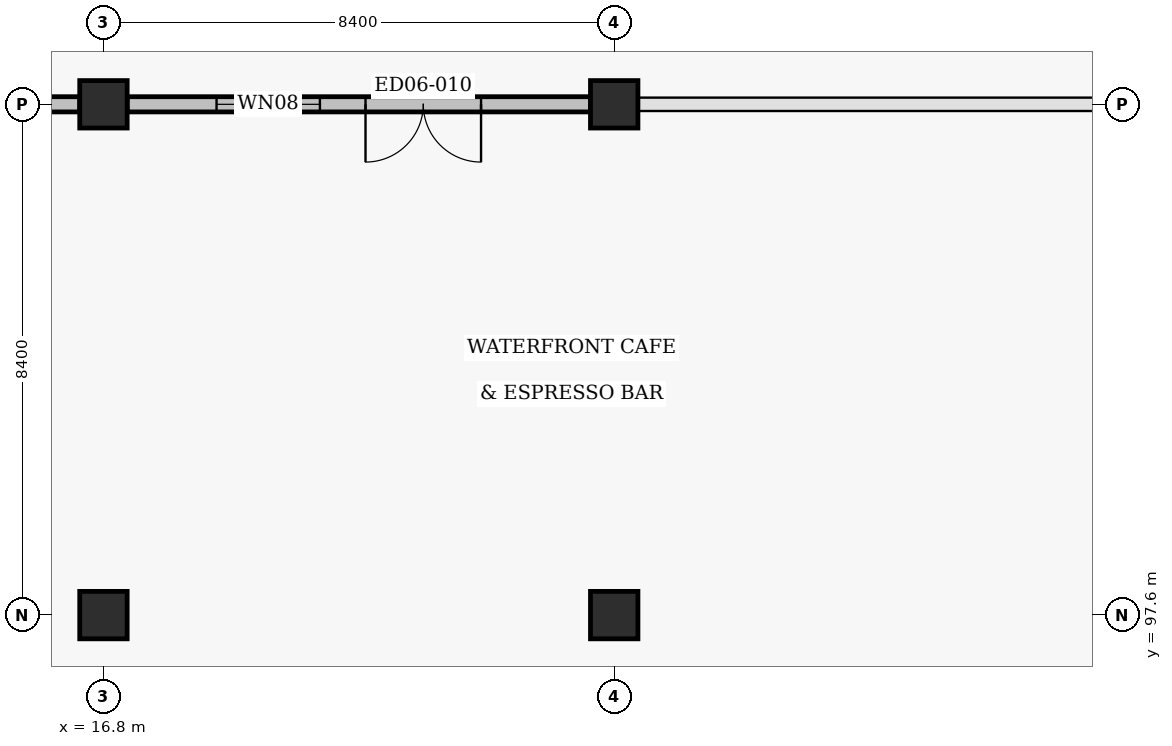
"""IFC4 building model, lengths in metres.
Left out: names, types, materials, properties, quantities, classifications, styles, units other than length and angle.
Written with IfcOpenShell. Run it as: python <this file> out.ifc"""

import sys

from ifc_helpers import new_model, si_unit, direction, frame, frame_2d, origin, origin_2d, place, context, subcontext, project, spatial, rectangle, circle, extrude, element, fill, save


model = new_model("IFC4")
c1 = context("Model", 3, precision=1e-05, world=origin(), true_north=direction((0.0, 1.0)))
c2 = subcontext(c1, "Body", "Model", "MODEL_VIEW")
j1 = project(units=[si_unit("LENGTHUNIT", "METRE"), si_unit("PLANEANGLEUNIT", "RADIAN")], contexts=[c1])
p1 = place(None, origin())
s1 = spatial("IfcSite", under=j1, at=p1, CompositionType="ELEMENT")
p2 = place(p1, origin())
s2 = spatial("IfcBuilding", under=s1, at=p2, CompositionType="ELEMENT")
p3 = place(p2, frame((0.0, 0.0, 9.6)))
s3 = spatial("IfcBuildingStorey", under=s2, at=p3, CompositionType="ELEMENT", Elevation=9.6)
p4 = place(p3, frame((16.8, 97.6, 0.0), z_axis=(0.0, 0.0, 1.0), x_axis=(1.0, 0.0, 0.0)))
e1 = element("IfcColumn", 1, at=p4, inside=s3, PredefinedType="COLUMN", context=c2, shape_type="SweptSolid", body=[
    extrude(circle(Radius=0.39, at=origin_2d()), origin(), (0.0, 0.0, 1.0), 10.186),
])
p5 = place(p3, frame((16.8, 106.0, 0.0), z_axis=(0.0, 0.0, 1.0), x_axis=(1.0, 0.0, 0.0)))
e2 = element("IfcColumn", 2, at=p5, inside=s3, PredefinedType="COLUMN", context=c2, shape_type="SweptSolid", body=[
    extrude(circle(Radius=0.39, at=origin_2d()), origin(), (0.0, 0.0, 1.0), 10.9),
])
p6 = place(p3, frame((25.2, 97.6, 0.0), z_axis=(0.0, 0.0, 1.0), x_axis=(1.0, 0.0, 0.0)))
e3 = element("IfcColumn", 3, at=p6, inside=s3, PredefinedType="COLUMN", context=c2, shape_type="SweptSolid", body=[
    extrude(circle(Radius=0.39, at=origin_2d()), origin(), (0.0, 0.0, 1.0), 7.708),
])
p7 = place(p3, frame((25.2, 106.0, 0.0), z_axis=(0.0, 0.0, 1.0), x_axis=(1.0, 0.0, 0.0)))
e4 = element("IfcColumn", 4, at=p7, inside=s3, PredefinedType="COLUMN", context=c2, shape_type="SweptSolid", body=[
    extrude(circle(Radius=0.39, at=origin_2d()), origin(), (0.0, 0.0, 1.0), 8.422),
])
p8 = place(p3, frame((16.41, 106.0, 0.0), z_axis=(0.0, 0.0, 1.0), x_axis=(-1.0, 0.0, 0.0)))
e5 = element("IfcWall", 5, at=p8, inside=s3, PredefinedType="SOLIDWALL", context=c2, shape_type="SweptSolid", body=[
    extrude(rectangle(XDim=7.62, YDim=0.25, at=frame_2d((3.81, 0.0))), origin(), (0.0, 0.0, 1.0), 5.243),
])
p9 = place(p8, frame((1.8, 0.0, 0.0)))
e6 = element("IfcOpeningElement", 6, at=p9, cuts=e5, PredefinedType="OPENING", context=c2, shape_type="SweptSolid", body=[
    extrude(rectangle(XDim=1.9, YDim=2.15, at=frame_2d((0.95, 1.075))), frame((0.0, 0.135, 0.0), z_axis=(0.0, -1.0, 0.0), x_axis=(1.0, 0.0, 0.0)), (0.0, 0.0, 1.0), 0.27),
])
p10 = place(p8, frame((4.45, 0.0, 0.9)))
e7 = element("IfcOpeningElement", 7, at=p10, cuts=e5, PredefinedType="OPENING", context=c2, shape_type="SweptSolid", body=[
    extrude(rectangle(XDim=2.1, YDim=1.6, at=frame_2d((1.05, 0.8))), frame((0.0, 0.135, 0.0), z_axis=(0.0, -1.0, 0.0), x_axis=(1.0, 0.0, 0.0)), (0.0, 0.0, 1.0), 0.27),
])
p11 = place(p3, frame((24.81, 106.0, 0.0), z_axis=(0.0, 0.0, 1.0), x_axis=(-1.0, 0.0, 0.0)))
e8 = element("IfcWall", 8, at=p11, inside=s3, PredefinedType="SOLIDWALL", context=c2, shape_type="SweptSolid", body=[
    extrude(rectangle(XDim=7.62, YDim=0.25, at=frame_2d((3.81, 0.0))), origin(), (0.0, 0.0, 1.0), 5.243),
])
p12 = place(p11, frame((1.8, 0.0, 0.0)))
e9 = element("IfcOpeningElement", 9, at=p12, cuts=e8, PredefinedType="OPENING", context=c2, shape_type="SweptSolid", body=[
    extrude(rectangle(XDim=1.9, YDim=2.15, at=frame_2d((0.95, 1.075))), frame((0.0, 0.135, 0.0), z_axis=(0.0, -1.0, 0.0), x_axis=(1.0, 0.0, 0.0)), (0.0, 0.0, 1.0), 0.27),
])
p13 = place(p11, frame((4.45, 0.0, 0.9)))
e10 = element("IfcOpeningElement", 10, at=p13, cuts=e8, PredefinedType="OPENING", context=c2, shape_type="SweptSolid", body=[
    extrude(rectangle(XDim=1.7, YDim=1.6, at=frame_2d((0.85, 0.8))), frame((0.0, 0.135, 0.0), z_axis=(0.0, -1.0, 0.0), x_axis=(1.0, 0.0, 0.0)), (0.0, 0.0, 1.0), 0.27),
])
p14 = place(p12, origin())
e11 = element("IfcDoor", 11, at=p14, inside=s3, OperationType="DOUBLE_DOOR_SINGLE_SWING", PredefinedType="DOOR", context=c2, shape_type="SweptSolid", body=[
    extrude(rectangle(XDim=1.9, YDim=2.15, at=frame_2d((0.95, 1.075))), frame((0.0, 0.025, 0.0), z_axis=(0.0, -1.0, 0.0), x_axis=(1.0, 0.0, 0.0)), (0.0, 0.0, 1.0), 0.05),
])
fill(e9, e11)
p15 = place(p13, origin())
e12 = element("IfcWindow", 12, at=p15, inside=s3, PartitioningType="DOUBLE_PANEL_VERTICAL", PredefinedType="WINDOW", context=c2, shape_type="SweptSolid", body=[
    extrude(rectangle(XDim=1.7, YDim=1.6, at=frame_2d((0.85, 0.8))), frame((0.0, 0.03, 0.0), z_axis=(0.0, -1.0, 0.0), x_axis=(1.0, 0.0, 0.0)), (0.0, 0.0, 1.0), 0.06),
])
fill(e10, e12)
save(model, sys.argv[1])
